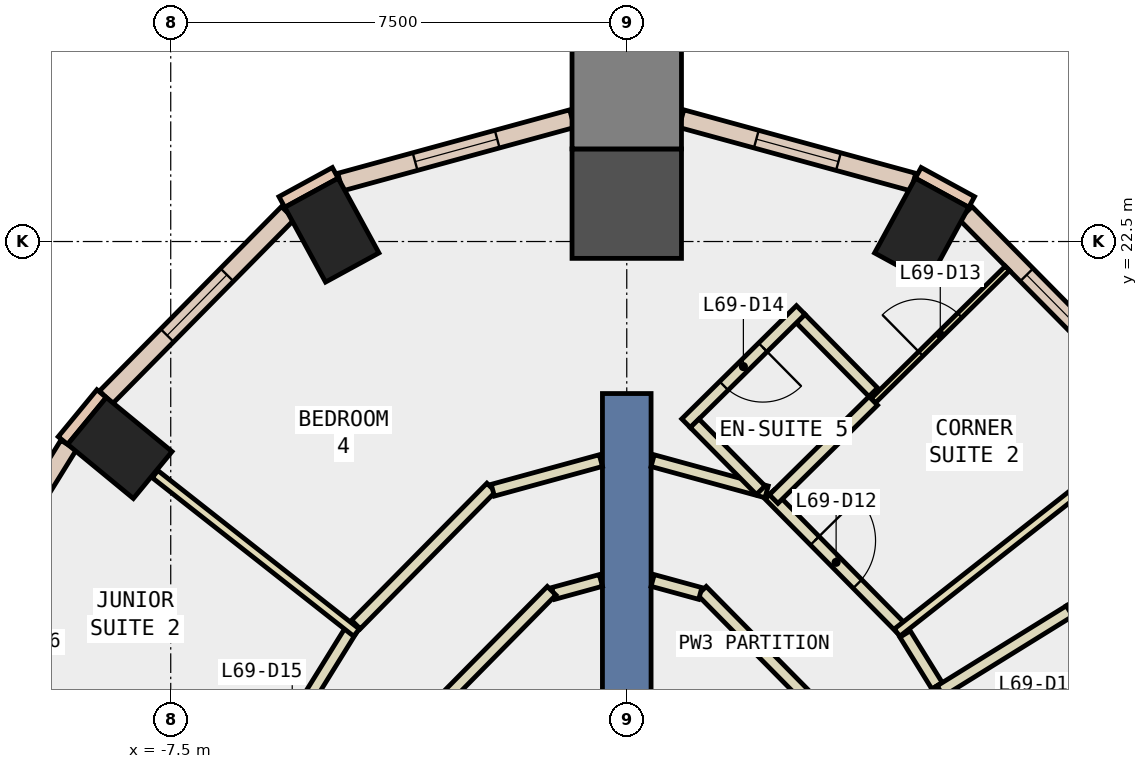
"""IFC4 building model, lengths in metres.
Left out: names, types, materials, properties, quantities, classifications, styles, units other than length and angle.
Written with IfcOpenShell. Run it as: python <this file> out.ifc"""

import sys

from ifc_helpers import new_model, si_unit, direction, frame, frame_2d, origin, origin_2d, place, context, subcontext, project, spatial, rectangle, extrude, element, fill, save


model = new_model("IFC4")
c1 = context("Model", 3, precision=1e-05, world=origin(), true_north=direction((0.0, 1.0)))
c2 = subcontext(c1, "Body", "Model", "MODEL_VIEW")
j1 = project(units=[si_unit("LENGTHUNIT", "METRE"), si_unit("PLANEANGLEUNIT", "RADIAN")], contexts=[c1])
p1 = place(None, origin())
s1 = spatial("IfcSite", under=j1, at=p1, CompositionType="ELEMENT")
p2 = place(p1, origin())
s2 = spatial("IfcBuilding", under=s1, at=p2, CompositionType="ELEMENT")
p3 = place(p2, frame((0.0, 0.0, 297.2)))
s3 = spatial("IfcBuildingStorey", under=s2, at=p3, CompositionType="ELEMENT", Elevation=297.2)
p4 = place(p3, frame((4.85, 22.687, -0.34), z_axis=(0.0, 0.0, 1.0), x_axis=(-0.877899414566, 0.478845087586, 0.0)))
e1 = element("IfcColumn", 1, at=p4, inside=s3, PredefinedType="COLUMN", context=c2, shape_type="SweptSolid", body=[
    extrude(rectangle(XDim=1.0, YDim=1.4, at=origin_2d()), origin(), (0.0, 0.0, 1.0), 3.6),
])
p5 = place(p3, frame((0.0, 23.123, -0.34), z_axis=(0.0, 0.0, 1.0), x_axis=(0.0, 1.0, 0.0)))
e2 = element("IfcColumn", 2, at=p5, inside=s3, PredefinedType="COLUMN", context=c2, shape_type="SweptSolid", body=[
    extrude(rectangle(XDim=1.8, YDim=1.8, at=origin_2d()), origin(), (0.0, 0.0, 1.0), 3.6),
])
for number, where, z_axis, x_axis in (
    (3, (-4.85, 22.687, -0.34), (0.0, 0.0, 1.0), (0.878, 0.479, 0.0)),
    (4, (-8.337, 19.105, -0.34), (0.0, 0.0, 1.0), (0.636, 0.772, 0.0)),
):
    element("IfcColumn", number, at=place(p3, frame(where, z_axis=z_axis, x_axis=x_axis)), inside=s3, PredefinedType="COLUMN", context=c2, shape_type="SweptSolid", body=[
        extrude(rectangle(XDim=1.0, YDim=1.4, at=origin_2d()), origin(), (0.0, 0.0, 1.0), 3.6),
    ])
p6 = place(p3, frame((0.0, 24.923, -0.34), z_axis=(0.0, 0.0, 1.0), x_axis=(0.0, 1.0, 0.0)))
e5 = element("IfcColumn", 5, at=p6, inside=s3, PredefinedType="COLUMN", context=c2, shape_type="SweptSolid", body=[
    extrude(rectangle(XDim=1.8, YDim=1.8, at=origin_2d()), origin(), (0.0, 0.0, 1.0), 3.6),
])
p7 = place(p3, frame((0.0, 11.0, -0.34), z_axis=(0.0, 0.0, 1.0), x_axis=(0.0, 1.0, 0.0)))
e6 = element("IfcWall", 6, at=p7, inside=s3, PredefinedType="SHEAR", context=c2, shape_type="SweptSolid", body=[
    extrude(rectangle(XDim=9.0, YDim=0.8, at=frame_2d((4.5, 0.0))), origin(), (0.0, 0.0, 1.0), 3.6),
])
for number, where, z_axis, x_axis in (
    (7, (5.672, 23.15, 0.0), (0.0, 0.0, 1.0), (-0.878, 0.479, 0.0)),
    (8, (-4.794, 23.629, 0.0), (0.0, 0.0, 1.0), (-0.878, -0.479, 0.0)),
    (9, (-8.637, 19.999, 0.0), (0.0, 0.0, 1.0), (-0.636, -0.772, 0.0)),
):
    element("IfcWall", number, at=place(p3, frame(where, z_axis=z_axis, x_axis=x_axis)), inside=s3, PredefinedType="STANDARD", context=c2, shape_type="SweptSolid", body=[
        extrude(rectangle(XDim=1.0, YDim=0.2, at=frame_2d((0.5, 0.0))), origin(), (0.0, 0.0, 1.0), 3.26),
    ])
p8 = place(p3, frame((8.564, 19.938, 0.0), z_axis=(0.0, 0.0, 1.0), x_axis=(-0.70250598769, 0.711677832491, 0.0)))
e10 = element("IfcWall", 10, at=p8, inside=s3, PredefinedType="STANDARD", context=c2, shape_type="SweptSolid", body=[
    extrude(rectangle(XDim=4.259, YDim=0.3, at=frame_2d((2.129, 0.0))), origin(), (0.0, 0.0, 1.0), 3.26),
])
p9 = place(p8, frame((1.429, 0.0, 0.9)))
e11 = element("IfcOpeningElement", 11, at=p9, cuts=e10, PredefinedType="OPENING", context=c2, shape_type="SweptSolid", body=[
    extrude(rectangle(XDim=1.4, YDim=2.0, at=frame_2d((0.7, 1.0))), frame((0.0, 0.16, 0.0), z_axis=(0.0, -1.0, 0.0), x_axis=(1.0, 0.0, 0.0)), (0.0, 0.0, 1.0), 0.32),
])
p10 = place(p3, frame((4.713, 23.477, 0.0), z_axis=(0.0, 0.0, 1.0), x_axis=(-0.964521196932, 0.264005417877, 0.0)))
e12 = element("IfcWall", 12, at=p10, inside=s3, PredefinedType="STANDARD", context=c2, shape_type="SweptSolid", body=[
    extrude(rectangle(XDim=3.954, YDim=0.3, at=frame_2d((1.977, 0.0))), origin(), (0.0, 0.0, 1.0), 3.26),
])
p11 = place(p10, frame((1.277, 0.0, 0.9)))
e13 = element("IfcOpeningElement", 13, at=p11, cuts=e12, PredefinedType="OPENING", context=c2, shape_type="SweptSolid", body=[
    extrude(rectangle(XDim=1.4, YDim=2.0, at=frame_2d((0.7, 1.0))), frame((0.0, 0.16, 0.0), z_axis=(0.0, -1.0, 0.0), x_axis=(1.0, 0.0, 0.0)), (0.0, 0.0, 1.0), 0.32),
])
p12 = place(p3, frame((-0.899, 24.521, 0.0), z_axis=(0.0, 0.0, 1.0), x_axis=(-0.964521196932, -0.264005417877, 0.0)))
e14 = element("IfcWall", 14, at=p12, inside=s3, PredefinedType="STANDARD", context=c2, shape_type="SweptSolid", body=[
    extrude(rectangle(XDim=3.954, YDim=0.3, at=frame_2d((1.977, 0.0))), origin(), (0.0, 0.0, 1.0), 3.26),
])
p13 = place(p12, frame((1.277, 0.0, 0.9)))
e15 = element("IfcOpeningElement", 15, at=p13, cuts=e14, PredefinedType="OPENING", context=c2, shape_type="SweptSolid", body=[
    extrude(rectangle(XDim=1.4, YDim=2.0, at=frame_2d((0.7, 1.0))), frame((0.0, 0.16, 0.0), z_axis=(0.0, -1.0, 0.0), x_axis=(1.0, 0.0, 0.0)), (0.0, 0.0, 1.0), 0.32),
])
p14 = place(p3, frame((-5.572, 22.969, 0.0), z_axis=(0.0, 0.0, 1.0), x_axis=(-0.70250598769, -0.711677832491, 0.0)))
e16 = element("IfcWall", 16, at=p14, inside=s3, PredefinedType="STANDARD", context=c2, shape_type="SweptSolid", body=[
    extrude(rectangle(XDim=4.259, YDim=0.3, at=frame_2d((2.129, 0.0))), origin(), (0.0, 0.0, 1.0), 3.26),
])
p15 = place(p14, frame((1.429, 0.0, 0.9)))
e17 = element("IfcOpeningElement", 17, at=p15, cuts=e16, PredefinedType="OPENING", context=c2, shape_type="SweptSolid", body=[
    extrude(rectangle(XDim=1.4, YDim=2.0, at=frame_2d((0.7, 1.0))), frame((0.0, 0.16, 0.0), z_axis=(0.0, -1.0, 0.0), x_axis=(1.0, 0.0, 0.0)), (0.0, 0.0, 1.0), 0.32),
])
p16 = place(p3, frame((-9.18, 19.153, 0.0), z_axis=(0.0, 0.0, 1.0), x_axis=(-0.526409529565, -0.850231149267, 0.0)))
e18 = element("IfcWall", 18, at=p16, inside=s3, PredefinedType="STANDARD", context=c2, shape_type="SweptSolid", body=[
    extrude(rectangle(XDim=7.346, YDim=0.3, at=frame_2d((3.673, 0.0))), origin(), (0.0, 0.0, 1.0), 3.26),
])
p17 = place(p16, frame((0.737, 0.0, 0.9)))
e19 = element("IfcOpeningElement", 19, at=p17, cuts=e18, PredefinedType="OPENING", context=c2, shape_type="SweptSolid", body=[
    extrude(rectangle(XDim=2.2, YDim=2.0, at=frame_2d((1.1, 1.0))), frame((0.0, 0.16, 0.0), z_axis=(0.0, -1.0, 0.0), x_axis=(1.0, 0.0, 0.0)), (0.0, 0.0, 1.0), 0.32),
])
p18 = place(p16, frame((4.41, 0.0, 0.9)))
e20 = element("IfcOpeningElement", 20, at=p18, cuts=e18, PredefinedType="OPENING", context=c2, shape_type="SweptSolid", body=[
    extrude(rectangle(XDim=2.2, YDim=2.0, at=frame_2d((1.1, 1.0))), frame((0.0, 0.16, 0.0), z_axis=(0.0, -1.0, 0.0), x_axis=(1.0, 0.0, 0.0)), (0.0, 0.0, 1.0), 0.32),
])
p19 = place(p3, frame((2.951, 15.019, 0.0), z_axis=(0.0, 0.0, 1.0), x_axis=(-0.702341227034, 0.711840432126, 0.0)))
e21 = element("IfcWall", 21, at=p19, inside=s3, PredefinedType="PARTITIONING", context=c2, shape_type="SweptSolid", body=[
    extrude(rectangle(XDim=2.442, YDim=0.2, at=frame_2d((1.221, 0.0))), origin(), (0.0, 0.0, 1.0), 3.26),
])
p20 = place(p3, frame((1.209, 16.712, 0.0), z_axis=(0.0, 0.0, 1.0), x_axis=(-0.964583129746, 0.26377904733, 0.0)))
e22 = element("IfcWall", 22, at=p20, inside=s3, PredefinedType="PARTITIONING", context=c2, shape_type="SweptSolid", body=[
    extrude(rectangle(XDim=0.812, YDim=0.2, at=frame_2d((0.406, 0.0))), origin(), (0.0, 0.0, 1.0), 3.26),
])
p21 = place(p3, frame((-0.426, 16.927, 0.0), z_axis=(0.0, 0.0, 1.0), x_axis=(-0.964276465753, -0.264897900321, 0.0)))
e23 = element("IfcWall", 23, at=p21, inside=s3, PredefinedType="PARTITIONING", context=c2, shape_type="SweptSolid", body=[
    extrude(rectangle(XDim=0.812, YDim=0.2, at=frame_2d((0.406, 0.0))), origin(), (0.0, 0.0, 1.0), 3.26),
])
p22 = place(p3, frame((-1.236, 16.757, 0.0), z_axis=(0.0, 0.0, 1.0), x_axis=(-0.702341227034, -0.711840432126, 0.0)))
e24 = element("IfcWall", 24, at=p22, inside=s3, PredefinedType="PARTITIONING", context=c2, shape_type="SweptSolid", body=[
    extrude(rectangle(XDim=2.442, YDim=0.2, at=frame_2d((1.221, 0.0))), origin(), (0.0, 0.0, 1.0), 3.26),
])
p23 = place(p3, frame((4.577, 16.045, 0.0), z_axis=(0.0, 0.0, 1.0), x_axis=(0.526203576349, -0.850358628014, 0.0)))
e25 = element("IfcWall", 25, at=p23, inside=s3, PredefinedType="PARTITIONING", context=c2, shape_type="SweptSolid", body=[
    extrude(rectangle(XDim=1.002, YDim=0.2, at=frame_2d((0.501, 0.0))), origin(), (0.0, 0.0, 1.0), 3.26),
])
p24 = place(p3, frame((5.104, 15.193, 0.0), z_axis=(0.0, 0.0, 1.0), x_axis=(0.526329401671, -0.850280754184, 0.0)))
e26 = element("IfcWall", 26, at=p24, inside=s3, PredefinedType="PARTITIONING", context=c2, shape_type="SweptSolid", body=[
    extrude(rectangle(XDim=3.0, YDim=0.2, at=frame_2d((1.5, 0.0))), origin(), (0.0, 0.0, 1.0), 3.26),
])
p25 = place(p3, frame((2.346, 18.336, 0.0), z_axis=(0.0, 0.0, 1.0), x_axis=(0.702481985573, -0.711701524479, 0.0)))
e27 = element("IfcWall", 27, at=p25, inside=s3, PredefinedType="PARTITIONING", context=c2, shape_type="SweptSolid", body=[
    extrude(rectangle(XDim=3.125, YDim=0.2, at=frame_2d((1.562, 0.0))), origin(), (0.0, 0.0, 1.0), 3.26),
])
p26 = place(p25, frame((1.062, 0.0, 0.0)))
e28 = element("IfcOpeningElement", 28, at=p26, cuts=e27, PredefinedType="OPENING", context=c2, shape_type="SweptSolid", body=[
    extrude(rectangle(XDim=1.0, YDim=2.1, at=frame_2d((0.5, 1.05))), frame((0.0, 0.11, 0.0), z_axis=(0.0, -1.0, 0.0), x_axis=(1.0, 0.0, 0.0)), (0.0, 0.0, 1.0), 0.22),
])
p27 = place(p3, frame((-4.454, 16.201, 0.0), z_axis=(0.0, 0.0, 1.0), x_axis=(0.702505657511, 0.711678158415, 0.0)))
e29 = element("IfcWall", 29, at=p27, inside=s3, PredefinedType="PARTITIONING", context=c2, shape_type="SweptSolid", body=[
    extrude(rectangle(XDim=3.167, YDim=0.2, at=frame_2d((1.584, 0.0))), origin(), (0.0, 0.0, 1.0), 3.26),
])
p28 = place(p3, frame((-2.203, 18.41, 0.0), z_axis=(0.0, 0.0, 1.0), x_axis=(0.964423583418, 0.264361781934, 0.0)))
e30 = element("IfcWall", 30, at=p28, inside=s3, PredefinedType="PARTITIONING", context=c2, shape_type="SweptSolid", body=[
    extrude(rectangle(XDim=1.842, YDim=0.2, at=frame_2d((0.921, 0.0))), origin(), (0.0, 0.0, 1.0), 3.26),
])
p29 = place(p3, frame((0.426, 18.896, 0.0), z_axis=(0.0, 0.0, 1.0), x_axis=(0.964522741234, -0.263999775838, 0.0)))
e31 = element("IfcWall", 31, at=p29, inside=s3, PredefinedType="PARTITIONING", context=c2, shape_type="SweptSolid", body=[
    extrude(rectangle(XDim=1.943, YDim=0.2, at=frame_2d((0.971, 0.0))), origin(), (0.0, 0.0, 1.0), 3.26),
])
p30 = place(p3, frame((-6.493, 12.95, 0.0), z_axis=(0.0, 0.0, 1.0), x_axis=(0.526432748426, 0.850216773173, 0.0)))
e32 = element("IfcWall", 32, at=p30, inside=s3, PredefinedType="PARTITIONING", context=c2, shape_type="SweptSolid", body=[
    extrude(rectangle(XDim=3.765, YDim=0.2, at=frame_2d((1.882, 0.0))), origin(), (0.0, 0.0, 1.0), 3.26),
])
p31 = place(p30, frame((1.383, 0.0, 0.0)))
e33 = element("IfcOpeningElement", 33, at=p31, cuts=e32, PredefinedType="OPENING", context=c2, shape_type="SweptSolid", body=[
    extrude(rectangle(XDim=1.0, YDim=2.1, at=frame_2d((0.5, 1.05))), frame((0.0, 0.11, 0.0), z_axis=(0.0, -1.0, 0.0), x_axis=(1.0, 0.0, 0.0)), (0.0, 0.0, 1.0), 0.22),
])
p32 = place(p3, frame((8.999, 13.841, 0.0), z_axis=(0.0, 0.0, 1.0), x_axis=(-0.526283695852, 0.850309044689, 0.0)))
e34 = element("IfcWall", 34, at=p32, inside=s3, PredefinedType="PARTITIONING", context=c2, shape_type="SweptSolid", body=[
    extrude(rectangle(XDim=3.2, YDim=0.2, at=frame_2d((1.6, 0.0))), origin(), (0.0, 0.0, 1.0), 3.26),
])
p33 = place(p32, frame((1.15, 0.0, 0.0)))
e35 = element("IfcOpeningElement", 35, at=p33, cuts=e34, PredefinedType="OPENING", context=c2, shape_type="SweptSolid", body=[
    extrude(rectangle(XDim=0.9, YDim=2.1, at=frame_2d((0.45, 1.05))), frame((0.0, 0.11, 0.0), z_axis=(0.0, -1.0, 0.0), x_axis=(1.0, 0.0, 0.0)), (0.0, 0.0, 1.0), 0.22),
])
p34 = place(p3, frame((7.282, 16.424, 0.0), z_axis=(0.0, 0.0, 1.0), x_axis=(-0.850142312258, -0.526552987751, 0.0)))
e36 = element("IfcWall", 36, at=p34, inside=s3, PredefinedType="PARTITIONING", context=c2, shape_type="SweptSolid", body=[
    extrude(rectangle(XDim=2.5, YDim=0.2, at=frame_2d((1.25, 0.0))), origin(), (0.0, 0.0, 1.0), 3.26),
])
p35 = place(p3, frame((4.445, 16.068, 0.0), z_axis=(0.0, 0.0, 1.0), x_axis=(0.785872006963, 0.618389188677, 0.0)))
e37 = element("IfcWall", 37, at=p35, inside=s3, PredefinedType="PARTITIONING", context=c2, shape_type="SweptSolid", body=[
    extrude(rectangle(XDim=4.216, YDim=0.15, at=frame_2d((2.108, 0.0))), origin(), (0.0, 0.0, 1.0), 3.26),
])
p36 = place(p3, frame((4.053, 19.881, 0.0), z_axis=(0.0, 0.0, 1.0), x_axis=(0.711776071152, 0.702406452516, 0.0)))
e38 = element("IfcWall", 38, at=p36, inside=s3, PredefinedType="PARTITIONING", context=c2, shape_type="SweptSolid", body=[
    extrude(rectangle(XDim=3.101, YDim=0.1, at=frame_2d((1.55, 0.0))), origin(), (0.0, 0.0, 1.0), 3.26),
])
p37 = place(p36, frame((1.1, 0.0, 0.0)))
e39 = element("IfcOpeningElement", 39, at=p37, cuts=e38, PredefinedType="OPENING", context=c2, shape_type="SweptSolid", body=[
    extrude(rectangle(XDim=0.9, YDim=2.1, at=frame_2d((0.45, 1.05))), frame((0.0, 0.06, 0.0), z_axis=(0.0, -1.0, 0.0), x_axis=(1.0, 0.0, 0.0)), (0.0, 0.0, 1.0), 0.12),
])
p38 = place(p3, frame((2.416, 18.265, 0.0), z_axis=(0.0, 0.0, 1.0), x_axis=(0.71207765541, 0.702100714047, 0.0)))
e40 = element("IfcWall", 40, at=p38, inside=s3, PredefinedType="PARTITIONING", context=c2, shape_type="SweptSolid", body=[
    extrude(rectangle(XDim=2.3, YDim=0.2, at=frame_2d((1.15, 0.0))), origin(), (0.0, 0.0, 1.0), 3.26),
])
p39 = place(p3, frame((4.054, 20.022, 0.0), z_axis=(0.0, 0.0, 1.0), x_axis=(-0.702351102688, 0.711830688123, 0.0)))
e41 = element("IfcWall", 41, at=p39, inside=s3, PredefinedType="PARTITIONING", context=c2, shape_type="SweptSolid", body=[
    extrude(rectangle(XDim=1.7, YDim=0.2, at=frame_2d((0.85, 0.0))), origin(), (0.0, 0.0, 1.0), 3.26),
])
p40 = place(p3, frame((2.861, 21.374, 0.0), z_axis=(0.0, 0.0, 1.0), x_axis=(-0.711606122075, -0.702578626934, 0.0)))
e42 = element("IfcWall", 42, at=p40, inside=s3, PredefinedType="PARTITIONING", context=c2, shape_type="SweptSolid", body=[
    extrude(rectangle(XDim=2.65, YDim=0.2, at=frame_2d((1.325, 0.0))), origin(), (0.0, 0.0, 1.0), 3.26),
])
p41 = place(p40, frame((0.875, 0.0, 0.0)))
e43 = element("IfcOpeningElement", 43, at=p41, cuts=e42, PredefinedType="OPENING", context=c2, shape_type="SweptSolid", body=[
    extrude(rectangle(XDim=0.9, YDim=2.1, at=frame_2d((0.45, 1.05))), frame((0.0, 0.11, 0.0), z_axis=(0.0, -1.0, 0.0), x_axis=(1.0, 0.0, 0.0)), (0.0, 0.0, 1.0), 0.22),
])
p42 = place(p3, frame((1.116, 19.511, 0.0), z_axis=(0.0, 0.0, 1.0), x_axis=(0.702515837086, -0.711668109896, 0.0)))
e44 = element("IfcWall", 44, at=p42, inside=s3, PredefinedType="PARTITIONING", context=c2, shape_type="SweptSolid", body=[
    extrude(rectangle(XDim=1.547, YDim=0.2, at=frame_2d((0.773, 0.0))), origin(), (0.0, 0.0, 1.0), 3.26),
])
p43 = place(p3, frame((-4.445, 16.068, 0.0), z_axis=(0.0, 0.0, 1.0), x_axis=(-0.785872006963, 0.618389188677, 0.0)))
e45 = element("IfcWall", 45, at=p43, inside=s3, PredefinedType="PARTITIONING", context=c2, shape_type="SweptSolid", body=[
    extrude(rectangle(XDim=4.216, YDim=0.15, at=frame_2d((2.108, 0.0))), origin(), (0.0, 0.0, 1.0), 3.26),
])
p44 = place(p3, frame((-8.906, 14.562, 0.0), z_axis=(0.0, 0.0, 1.0), x_axis=(-0.850186034224, 0.526482390219, 0.0)))
e46 = element("IfcWall", 46, at=p44, inside=s3, PredefinedType="PARTITIONING", context=c2, shape_type="SweptSolid", body=[
    extrude(rectangle(XDim=2.5, YDim=0.1, at=frame_2d((1.25, 0.0))), origin(), (0.0, 0.0, 1.0), 3.26),
])
p45 = place(p44, frame((0.8, 0.0, 0.0)))
e47 = element("IfcOpeningElement", 47, at=p45, cuts=e46, PredefinedType="OPENING", context=c2, shape_type="SweptSolid", body=[
    extrude(rectangle(XDim=0.9, YDim=2.1, at=frame_2d((0.45, 1.05))), frame((0.0, 0.06, 0.0), z_axis=(0.0, -1.0, 0.0), x_axis=(1.0, 0.0, 0.0)), (0.0, 0.0, 1.0), 0.12),
])
p46 = place(p9, origin())
e48 = element("IfcWindow", 48, at=p46, inside=s3, PartitioningType="SINGLE_PANEL", PredefinedType="WINDOW", context=c2, shape_type="SweptSolid", body=[
    extrude(rectangle(XDim=1.4, YDim=2.0, at=frame_2d((0.7, 1.0))), frame((0.0, 0.03, 0.0), z_axis=(0.0, -1.0, 0.0), x_axis=(1.0, 0.0, 0.0)), (0.0, 0.0, 1.0), 0.06),
])
fill(e11, e48)
p47 = place(p11, origin())
e49 = element("IfcWindow", 49, at=p47, inside=s3, PartitioningType="SINGLE_PANEL", PredefinedType="WINDOW", context=c2, shape_type="SweptSolid", body=[
    extrude(rectangle(XDim=1.4, YDim=2.0, at=frame_2d((0.7, 1.0))), frame((0.0, 0.03, 0.0), z_axis=(0.0, -1.0, 0.0), x_axis=(1.0, 0.0, 0.0)), (0.0, 0.0, 1.0), 0.06),
])
fill(e13, e49)
p48 = place(p13, origin())
e50 = element("IfcWindow", 50, at=p48, inside=s3, PartitioningType="SINGLE_PANEL", PredefinedType="WINDOW", context=c2, shape_type="SweptSolid", body=[
    extrude(rectangle(XDim=1.4, YDim=2.0, at=frame_2d((0.7, 1.0))), frame((0.0, 0.03, 0.0), z_axis=(0.0, -1.0, 0.0), x_axis=(1.0, 0.0, 0.0)), (0.0, 0.0, 1.0), 0.06),
])
fill(e15, e50)
p49 = place(p15, origin())
e51 = element("IfcWindow", 51, at=p49, inside=s3, PartitioningType="SINGLE_PANEL", PredefinedType="WINDOW", context=c2, shape_type="SweptSolid", body=[
    extrude(rectangle(XDim=1.4, YDim=2.0, at=frame_2d((0.7, 1.0))), frame((0.0, 0.03, 0.0), z_axis=(0.0, -1.0, 0.0), x_axis=(1.0, 0.0, 0.0)), (0.0, 0.0, 1.0), 0.06),
])
fill(e17, e51)
p50 = place(p26, origin())
e52 = element("IfcDoor", 52, at=p50, inside=s3, OperationType="SINGLE_SWING_LEFT", PredefinedType="DOOR", context=c2, shape_type="SweptSolid", body=[
    extrude(rectangle(XDim=1.0, YDim=2.1, at=frame_2d((0.5, 1.05))), frame((0.0, 0.025, 0.0), z_axis=(0.0, -1.0, 0.0), x_axis=(1.0, 0.0, 0.0)), (0.0, 0.0, 1.0), 0.05),
])
fill(e28, e52)
p51 = place(p37, origin())
e53 = element("IfcDoor", 53, at=p51, inside=s3, OperationType="SINGLE_SWING_LEFT", PredefinedType="DOOR", context=c2, shape_type="SweptSolid", body=[
    extrude(rectangle(XDim=0.9, YDim=2.1, at=frame_2d((0.45, 1.05))), frame((0.0, 0.025, 0.0), z_axis=(0.0, -1.0, 0.0), x_axis=(1.0, 0.0, 0.0)), (0.0, 0.0, 1.0), 0.05),
])
fill(e39, e53)
p52 = place(p41, origin())
e54 = element("IfcDoor", 54, at=p52, inside=s3, OperationType="SINGLE_SWING_LEFT", PredefinedType="DOOR", context=c2, shape_type="SweptSolid", body=[
    extrude(rectangle(XDim=0.9, YDim=2.1, at=frame_2d((0.45, 1.05))), frame((0.0, 0.025, 0.0), z_axis=(0.0, -1.0, 0.0), x_axis=(1.0, 0.0, 0.0)), (0.0, 0.0, 1.0), 0.05),
])
fill(e43, e54)
save(model, sys.argv[1])
